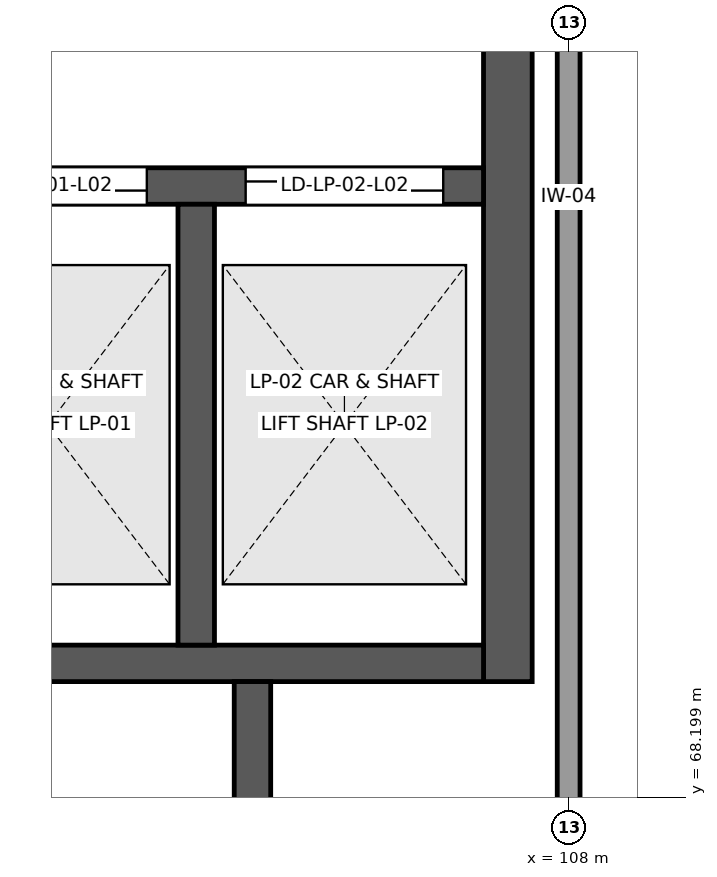
"""IFC4 building model, lengths in metres.
Left out: names, types, materials, properties, quantities, classifications, styles, units other than length and angle.
Written with IfcOpenShell. Run it as: python <this file> out.ifc"""

import sys

from ifc_helpers import new_model, si_unit, direction, frame, frame_2d, origin, place, context, subcontext, project, spatial, rectangle, extrude, element, fill, save


model = new_model("IFC4")
c1 = context("Model", 3, precision=1e-05, world=origin(), true_north=direction((0.0, 1.0)))
c2 = subcontext(c1, "Body", "Model", "MODEL_VIEW")
j1 = project(units=[si_unit("LENGTHUNIT", "METRE"), si_unit("PLANEANGLEUNIT", "RADIAN")], contexts=[c1])
p1 = place(None, origin())
s1 = spatial("IfcSite", under=j1, at=p1, CompositionType="ELEMENT")
p2 = place(p1, origin())
s2 = spatial("IfcBuilding", under=s1, at=p2, CompositionType="ELEMENT")
p3 = place(p2, frame((0.0, 0.0, 9.9)))
s3 = spatial("IfcBuildingStorey", under=s2, at=p3, CompositionType="ELEMENT", Elevation=9.9)
p4 = place(p3, frame((107.6, 68.96, 0.0), z_axis=(0.0, 0.0, 1.0), x_axis=(0.0, 1.0, 0.0)))
e1 = element("IfcWall", 1, at=p4, inside=s3, PredefinedType="SHEAR", context=c2, shape_type="SweptSolid", body=[
    extrude(rectangle(XDim=9.04, YDim=0.32, at=frame_2d((4.52, 0.0))), origin(), (0.0, 0.0, 1.0), 4.16),
])
p5 = place(p3, frame((103.54, 72.22, 0.0), z_axis=(0.0, 0.0, 1.0), x_axis=(1.0, 0.0, 0.0)))
e2 = element("IfcWall", 2, at=p5, inside=s3, PredefinedType="SHEAR", context=c2, shape_type="SweptSolid", body=[
    extrude(rectangle(XDim=3.9, YDim=0.24, at=frame_2d((1.95, 0.0))), origin(), (0.0, 0.0, 1.0), 4.31),
])
p6 = place(p5, frame((0.385, 0.0, 0.0)))
e3 = element("IfcOpeningElement", 3, at=p6, cuts=e2, PredefinedType="OPENING", context=c2, shape_type="SweptSolid", body=[
    extrude(rectangle(XDim=1.3, YDim=2.2, at=frame_2d((0.65, 1.1))), frame((0.0, 0.135, 0.0), z_axis=(0.0, -1.0, 0.0), x_axis=(1.0, 0.0, 0.0)), (0.0, 0.0, 1.0), 0.27),
])
p7 = place(p5, frame((2.335, 0.0, 0.0)))
e4 = element("IfcOpeningElement", 4, at=p7, cuts=e2, PredefinedType="OPENING", context=c2, shape_type="SweptSolid", body=[
    extrude(rectangle(XDim=1.3, YDim=2.2, at=frame_2d((0.65, 1.1))), frame((0.0, 0.135, 0.0), z_axis=(0.0, -1.0, 0.0), x_axis=(1.0, 0.0, 0.0)), (0.0, 0.0, 1.0), 0.27),
])
p8 = place(p3, frame((103.54, 69.08, 0.0), z_axis=(0.0, 0.0, 1.0), x_axis=(1.0, 0.0, 0.0)))
e5 = element("IfcWall", 5, at=p8, inside=s3, PredefinedType="SHEAR", context=c2, shape_type="SweptSolid", body=[
    extrude(rectangle(XDim=3.9, YDim=0.24, at=frame_2d((1.95, 0.0))), origin(), (0.0, 0.0, 1.0), 4.31),
])
p9 = place(p3, frame((105.55, 69.2, 0.0), z_axis=(0.0, 0.0, 1.0), x_axis=(0.0, 1.0, 0.0)))
e6 = element("IfcWall", 6, at=p9, inside=s3, PredefinedType="SHEAR", context=c2, shape_type="SweptSolid", body=[
    extrude(rectangle(XDim=2.9, YDim=0.24, at=frame_2d((1.45, 0.0))), origin(), (0.0, 0.0, 1.0), 4.31),
])
p10 = place(p3, frame((105.92, 66.96, 0.0), z_axis=(0.0, 0.0, 1.0), x_axis=(0.0, 1.0, 0.0)))
e7 = element("IfcWall", 7, at=p10, inside=s3, PredefinedType="SHEAR", context=c2, shape_type="SweptSolid", body=[
    extrude(rectangle(XDim=2.0, YDim=0.24, at=frame_2d((1.0, 0.0))), origin(), (0.0, 0.0, 1.0), 4.31),
])
p11 = place(p3, frame((108.0, 66.48, 0.0), z_axis=(0.0, 0.0, 1.0), x_axis=(0.0, 1.0, 0.0)))
e8 = element("IfcWall", 8, at=p11, inside=s3, PredefinedType="PARTITIONING", context=c2, shape_type="SweptSolid", body=[
    extrude(rectangle(XDim=11.34, YDim=0.15, at=frame_2d((5.67, 0.0))), origin(), (0.0, 0.0, 1.0), 3.705),
])
p12 = place(p6, origin())
e9 = element("IfcDoor", 9, at=p12, inside=s3, OperationType="DOUBLE_DOOR_SLIDING", PredefinedType="DOOR", context=c2, shape_type="SweptSolid", body=[
    extrude(rectangle(XDim=1.3, YDim=2.2, at=frame_2d((0.65, 1.1))), frame((0.0, 0.025, 0.0), z_axis=(0.0, -1.0, 0.0), x_axis=(1.0, 0.0, 0.0)), (0.0, 0.0, 1.0), 0.05),
])
fill(e3, e9)
p13 = place(p7, origin())
e10 = element("IfcDoor", 10, at=p13, inside=s3, OperationType="DOUBLE_DOOR_SLIDING", PredefinedType="DOOR", context=c2, shape_type="SweptSolid", body=[
    extrude(rectangle(XDim=1.3, YDim=2.2, at=frame_2d((0.65, 1.1))), frame((0.0, 0.025, 0.0), z_axis=(0.0, -1.0, 0.0), x_axis=(1.0, 0.0, 0.0)), (0.0, 0.0, 1.0), 0.05),
])
fill(e4, e10)
save(model, sys.argv[1])
